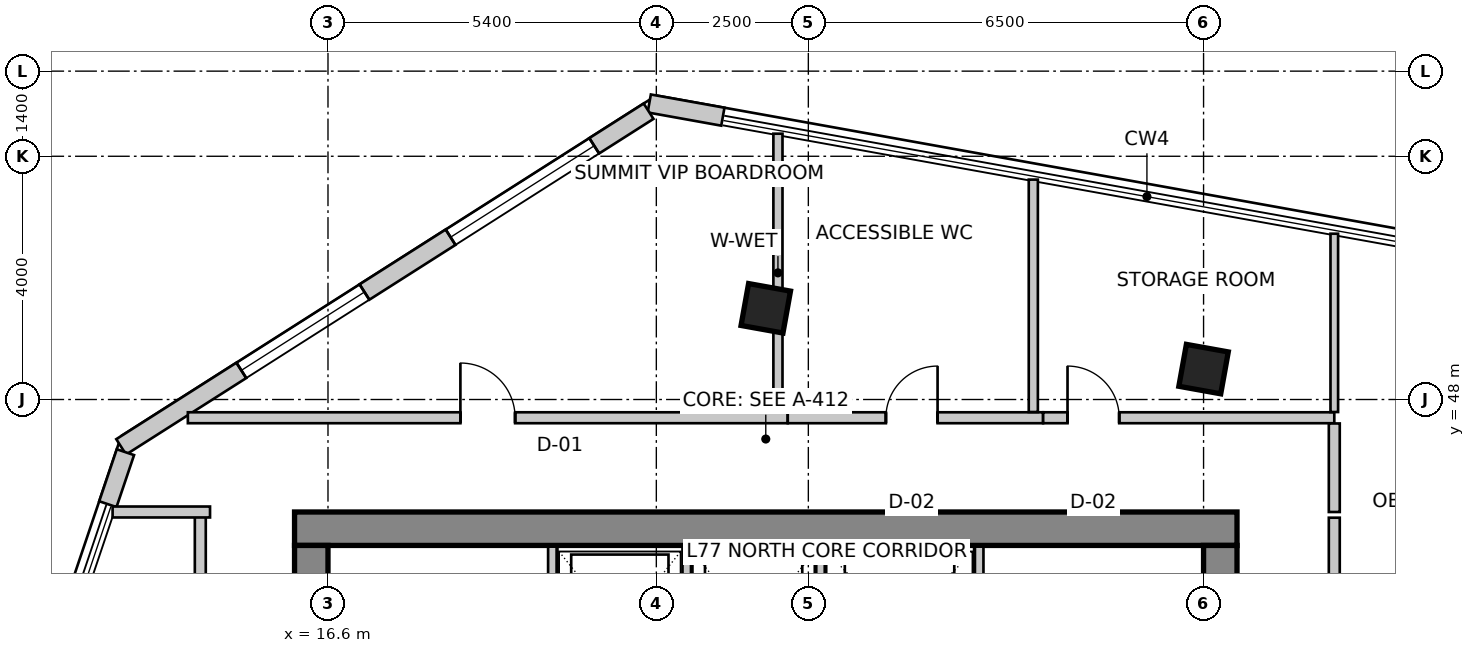
"""IFC4 building model, lengths in metres.
Left out: names, types, materials, properties, quantities, classifications, styles, units other than length and angle.
Written with IfcOpenShell. Run it as: python <this file> out.ifc"""

import sys

from ifc_helpers import new_model, si_unit, direction, frame, frame_2d, origin, origin_2d, place, context, subcontext, project, spatial, rectangle, extrude, source, transform, mapped, element, fill, save


model = new_model("IFC4")
c1 = context("Model", 3, precision=1e-05, world=origin(), true_north=direction((0.0, 1.0)))
c2 = subcontext(c1, "Body", "Model", "MODEL_VIEW")
j1 = project(units=[si_unit("LENGTHUNIT", "METRE"), si_unit("PLANEANGLEUNIT", "RADIAN")], contexts=[c1])
p1 = place(None, origin())
s1 = spatial("IfcSite", under=j1, at=p1, CompositionType="ELEMENT")
p2 = place(p1, origin())
s2 = spatial("IfcBuilding", under=s1, at=p2, CompositionType="ELEMENT")
p3 = place(p2, frame((0.0, 0.0, 300.5)))
s3 = spatial("IfcBuildingStorey", under=s2, at=p3, CompositionType="ELEMENT", Elevation=300.5)
p4 = place(p3, frame((16.05, 45.875, 0.0), z_axis=(0.0, 0.0, 1.0), x_axis=(1.0, 0.0, 0.0)))
e1 = element("IfcWall", 1, at=p4, inside=s3, PredefinedType="SHEAR", context=c2, shape_type="SweptSolid", body=[
    extrude(rectangle(XDim=15.5, YDim=0.55, at=frame_2d((7.75, 0.0))), origin(), (0.0, 0.0, 1.0), 4.0),
])
p5 = place(p3, frame((16.325, 34.2, 0.0), z_axis=(0.0, 0.0, 1.0), x_axis=(0.0, 1.0, 0.0)))
e2 = element("IfcWall", 2, at=p5, inside=s3, PredefinedType="SHEAR", context=c2, shape_type="SweptSolid", body=[
    extrude(rectangle(XDim=11.4, YDim=0.55, at=frame_2d((5.7, 0.0))), origin(), (0.0, 0.0, 1.0), 4.0),
])
m1 = source(origin(), c2, "Body", "SweptSolid", [
    extrude(rectangle(XDim=1.1, YDim=2.15, at=frame_2d((0.55, 1.075))), frame((0.0, 0.285, 0.0), z_axis=(0.0, -1.0, 0.0), x_axis=(1.0, 0.0, 0.0)), (0.0, 0.0, 1.0), 0.57),
])
p6 = place(p5, frame((7.15, 0.0, 0.0)))
e3 = element("IfcOpeningElement", 3, at=p6, cuts=e2, PredefinedType="OPENING", context=c2, shape_type="MappedRepresentation", body=[
    mapped(m1, transform((0.0, 0.0, 0.0), scale=1.0)),
])
p7 = place(p3, frame((31.275, 34.2, 0.0), z_axis=(0.0, 0.0, 1.0), x_axis=(0.0, 1.0, 0.0)))
e4 = element("IfcWall", 4, at=p7, inside=s3, PredefinedType="SHEAR", context=c2, shape_type="SweptSolid", body=[
    extrude(rectangle(XDim=11.4, YDim=0.55, at=frame_2d((5.7, 0.0))), origin(), (0.0, 0.0, 1.0), 4.0),
])
p8 = place(p7, frame((7.35, 0.0, 0.0)))
e5 = element("IfcOpeningElement", 5, at=p8, cuts=e4, PredefinedType="OPENING", context=c2, shape_type="MappedRepresentation", body=[
    mapped(m1, transform((0.0, 0.0, 0.0), scale=1.0)),
])
m2 = source(origin(), c2, "Body", "SweptSolid", [
    extrude(rectangle(XDim=0.7, YDim=0.7, at=origin_2d()), origin(), (0.0, 0.0, 1.0), 4.0),
])
for number, where, z_axis, x_axis in (
    (6, (23.8, 49.5, 0.0), (0.0, 0.0, 1.0), (0.984, -0.177, 0.0)),
    (7, (31.0, 48.5, 0.0), (0.0, 0.0, 1.0), (0.984, -0.177, 0.0)),
):
    element("IfcColumn", number, at=place(p3, frame(where, z_axis=z_axis, x_axis=x_axis)), inside=s3, PredefinedType="COLUMN", context=c2, shape_type="MappedRepresentation", body=[
        mapped(m2, transform((0.0, 0.0, 0.0), scale=1.0)),
    ])
p9 = place(p3, frame((23.094, 52.651, 0.0), z_axis=(0.0, 0.0, 1.0), x_axis=(-0.984233125072, 0.176876102146, 0.0)))
e8 = element("IfcWall", 8, at=p9, inside=s3, PredefinedType="SOLIDWALL", context=c2, shape_type="SweptSolid", body=[
    extrude(rectangle(XDim=1.23, YDim=0.3, at=frame_2d((0.615, 0.0))), origin(), (0.0, 0.0, 1.0), 3.7),
])
p10 = place(p3, frame((21.873, 52.741, 0.0), z_axis=(0.0, 0.0, 1.0), x_axis=(-0.843661487732, -0.536875492193, 0.0)))
e9 = element("IfcWall", 9, at=p10, inside=s3, PredefinedType="SOLIDWALL", context=c2, shape_type="SweptSolid", body=[
    extrude(rectangle(XDim=10.282, YDim=0.3, at=frame_2d((5.141, 0.0))), origin(), (0.0, 0.0, 1.0), 3.7),
])
m3 = source(origin(), c2, "Body", "SweptSolid", [
    extrude(rectangle(XDim=2.8, YDim=2.4, at=frame_2d((1.4, 1.2))), frame((0.0, 0.16, 0.0), z_axis=(0.0, -1.0, 0.0), x_axis=(1.0, 0.0, 0.0)), (0.0, 0.0, 1.0), 0.32),
])
p11 = place(p10, frame((1.06, 0.0, 0.85)))
e10 = element("IfcOpeningElement", 10, at=p11, cuts=e9, PredefinedType="OPENING", context=c2, shape_type="MappedRepresentation", body=[
    mapped(m3, transform((0.0, 0.0, 0.0), scale=1.0)),
])
m4 = source(origin(), c2, "Body", "SweptSolid", [
    extrude(rectangle(XDim=2.4, YDim=2.2, at=frame_2d((1.2, 1.1))), frame((0.0, 0.16, 0.0), z_axis=(0.0, -1.0, 0.0), x_axis=(1.0, 0.0, 0.0)), (0.0, 0.0, 1.0), 0.32),
])
p12 = place(p10, frame((5.539, 0.0, 0.85)))
e11 = element("IfcOpeningElement", 11, at=p12, cuts=e9, PredefinedType="OPENING", context=c2, shape_type="MappedRepresentation", body=[
    mapped(m4, transform((0.0, 0.0, 0.0), scale=1.0)),
])
p13 = place(p3, frame((13.269, 47.134, 0.0), z_axis=(0.0, 0.0, 1.0), x_axis=(-0.31995770778, -0.947431826166, 0.0)))
e12 = element("IfcWall", 12, at=p13, inside=s3, PredefinedType="SOLIDWALL", context=c2, shape_type="SweptSolid", body=[
    extrude(rectangle(XDim=0.903, YDim=0.3, at=frame_2d((0.451, 0.0))), origin(), (0.0, 0.0, 1.0), 3.7),
])
for number, where, z_axis, x_axis in (
    (13, (20.29, 43.28, 0.0), (0.0, 0.0, 1.0), (0.0, 1.0, 0.0)),
    (14, (27.31, 43.28, 0.0), (0.0, 0.0, 1.0), (0.0, 1.0, 0.0)),
):
    element("IfcWall", number, at=place(p3, frame(where, z_axis=z_axis, x_axis=x_axis)), inside=s3, PredefinedType="SOLIDWALL", context=c2, shape_type="SweptSolid", body=[
        extrude(rectangle(XDim=2.3, YDim=0.14, at=frame_2d((1.15, 0.0))), origin(), (0.0, 0.0, 1.0), 3.7),
    ])
for number, where, z_axis, x_axis in (
    (15, (22.5, 43.02, 0.0), (0.0, 0.0, 1.0), (0.0, 1.0, 0.0)),
    (16, (24.7, 43.02, 0.0), (0.0, 0.0, 1.0), (0.0, 1.0, 0.0)),
):
    element("IfcWall", number, at=place(p3, frame(where, z_axis=z_axis, x_axis=x_axis)), inside=s3, PredefinedType="SOLIDWALL", context=c2, shape_type="SweptSolid", body=[
        extrude(rectangle(XDim=2.56, YDim=0.14, at=frame_2d((1.28, 0.0))), origin(), (0.0, 0.0, 1.0), 3.7),
    ])
p14 = place(p3, frame((14.5, 33.744, 0.0), z_axis=(0.0, 0.0, 1.0), x_axis=(0.0, 1.0, 0.0)))
e17 = element("IfcWall", 17, at=p14, inside=s3, PredefinedType="PARTITIONING", context=c2, shape_type="SweptSolid", body=[
    extrude(rectangle(XDim=12.406, YDim=0.18, at=frame_2d((6.203, 0.0))), origin(), (0.0, 0.0, 1.0), 3.7),
])
m5 = source(origin(), c2, "Body", "SweptSolid", [
    extrude(rectangle(XDim=0.9, YDim=2.15, at=frame_2d((0.45, 1.075))), frame((0.0, 0.1, 0.0), z_axis=(0.0, -1.0, 0.0), x_axis=(1.0, 0.0, 0.0)), (0.0, 0.0, 1.0), 0.2),
])
p15 = place(p14, frame((4.37, 0.0, 0.0)))
e18 = element("IfcOpeningElement", 18, at=p15, cuts=e17, PredefinedType="OPENING", context=c2, shape_type="MappedRepresentation", body=[
    mapped(m5, transform((0.0, 0.0, 0.0), scale=1.0)),
])
p16 = place(p3, frame((14.66, 46.15, 0.0), z_axis=(0.0, 0.0, 1.0), x_axis=(-1.0, 0.0, 0.0)))
e19 = element("IfcWall", 19, at=p16, inside=s3, PredefinedType="PARTITIONING", context=c2, shape_type="SweptSolid", body=[
    extrude(rectangle(XDim=1.602, YDim=0.18, at=frame_2d((0.801, 0.0))), origin(), (0.0, 0.0, 1.0), 3.7),
])
p17 = place(p3, frame((14.295, 47.7, 0.0), z_axis=(0.0, 0.0, 1.0), x_axis=(1.0, 0.0, 0.0)))
e20 = element("IfcWall", 20, at=p17, inside=s3, PredefinedType="PARTITIONING", context=c2, shape_type="SweptSolid", body=[
    extrude(rectangle(XDim=9.865, YDim=0.18, at=frame_2d((4.932, 0.0))), origin(), (0.0, 0.0, 1.0), 3.384),
])
p18 = place(p17, frame((4.482, 0.0, 0.0)))
e21 = element("IfcOpeningElement", 21, at=p18, cuts=e20, PredefinedType="OPENING", context=c2, shape_type="MappedRepresentation", body=[
    mapped(m5, transform((0.0, 0.0, 0.0), scale=1.0)),
])
p19 = place(p3, frame((24.162, 47.7, 0.0), z_axis=(0.0, 0.0, 1.0), x_axis=(1.0, 0.0, 0.0)))
e22 = element("IfcWall", 22, at=p19, inside=s3, PredefinedType="PARTITIONING", context=c2, shape_type="SweptSolid", body=[
    extrude(rectangle(XDim=4.198, YDim=0.18, at=frame_2d((2.099, 0.0))), origin(), (0.0, 0.0, 1.0), 3.7),
])
m6 = source(origin(), c2, "Body", "SweptSolid", [
    extrude(rectangle(XDim=0.85, YDim=2.15, at=frame_2d((0.425, 1.075))), frame((0.0, 0.1, 0.0), z_axis=(0.0, -1.0, 0.0), x_axis=(1.0, 0.0, 0.0)), (0.0, 0.0, 1.0), 0.2),
])
p20 = place(p19, frame((1.613, 0.0, 0.0)))
e23 = element("IfcOpeningElement", 23, at=p20, cuts=e22, PredefinedType="OPENING", context=c2, shape_type="MappedRepresentation", body=[
    mapped(m6, transform((0.0, 0.0, 0.0), scale=1.0)),
])
p21 = place(p3, frame((28.362, 47.7, 0.0), z_axis=(0.0, 0.0, 1.0), x_axis=(1.0, 0.0, 0.0)))
e24 = element("IfcWall", 24, at=p21, inside=s3, PredefinedType="PARTITIONING", context=c2, shape_type="SweptSolid", body=[
    extrude(rectangle(XDim=4.788, YDim=0.18, at=frame_2d((2.394, 0.0))), origin(), (0.0, 0.0, 1.0), 3.272),
])
p22 = place(p21, frame((0.401, 0.0, 0.0)))
e25 = element("IfcOpeningElement", 25, at=p22, cuts=e24, PredefinedType="OPENING", context=c2, shape_type="MappedRepresentation", body=[
    mapped(m6, transform((0.0, 0.0, 0.0), scale=1.0)),
])
p23 = place(p3, frame((33.15, 47.606, 0.0), z_axis=(0.0, 0.0, 1.0), x_axis=(0.0, -1.0, 0.0)))
e26 = element("IfcWall", 26, at=p23, inside=s3, PredefinedType="PARTITIONING", context=c2, shape_type="SweptSolid", body=[
    extrude(rectangle(XDim=1.456, YDim=0.18, at=frame_2d((0.728, 0.0))), origin(), (0.0, 0.0, 1.0), 3.7),
])
p24 = place(p3, frame((33.15, 46.056, 0.0), z_axis=(0.0, 0.0, 1.0), x_axis=(0.0, -1.0, 0.0)))
e27 = element("IfcWall", 27, at=p24, inside=s3, PredefinedType="PARTITIONING", context=c2, shape_type="SweptSolid", body=[
    extrude(rectangle(XDim=6.216, YDim=0.18, at=frame_2d((3.108, 0.0))), origin(), (0.0, 0.0, 1.0), 3.272),
])
m7 = source(origin(), c2, "Body", "SweptSolid", [
    extrude(rectangle(XDim=1.6, YDim=2.15, at=frame_2d((0.8, 1.075))), frame((0.0, 0.1, 0.0), z_axis=(0.0, -1.0, 0.0), x_axis=(1.0, 0.0, 0.0)), (0.0, 0.0, 1.0), 0.2),
])
p25 = place(p24, frame((2.247, 0.0, 0.0)))
e28 = element("IfcOpeningElement", 28, at=p25, cuts=e27, PredefinedType="OPENING", context=c2, shape_type="MappedRepresentation", body=[
    mapped(m7, transform((0.0, 0.0, 0.0), scale=1.0)),
])
p26 = place(p3, frame((24.0, 52.371, 0.0), z_axis=(0.0, 0.0, 1.0), x_axis=(0.0, -1.0, 0.0)))
e29 = element("IfcWall", 29, at=p26, inside=s3, PredefinedType="PARTITIONING", context=c2, shape_type="SweptSolid", body=[
    extrude(rectangle(XDim=4.577, YDim=0.15, at=frame_2d((2.289, 0.0))), origin(), (0.0, 0.0, 1.0), 2.992),
])
p27 = place(p3, frame((28.2, 51.616, 0.0), z_axis=(0.0, 0.0, 1.0), x_axis=(0.0, -1.0, 0.0)))
e30 = element("IfcWall", 30, at=p27, inside=s3, PredefinedType="PARTITIONING", context=c2, shape_type="SweptSolid", body=[
    extrude(rectangle(XDim=3.822, YDim=0.15, at=frame_2d((1.911, 0.0))), origin(), (0.0, 0.0, 1.0), 2.992),
])
p28 = place(p3, frame((33.15, 50.727, 0.0), z_axis=(0.0, 0.0, 1.0), x_axis=(0.0, -1.0, 0.0)))
e31 = element("IfcWall", 31, at=p28, inside=s3, PredefinedType="PARTITIONING", context=c2, shape_type="SweptSolid", body=[
    extrude(rectangle(XDim=2.933, YDim=0.125, at=frame_2d((1.466, 0.0))), origin(), (0.0, 0.0, 1.0), 2.992),
])
m8 = source(origin(), c2, "Body", "SweptSolid", [
    extrude(rectangle(XDim=2.8, YDim=2.4, at=frame_2d((1.4, 1.2))), frame((0.0, -0.015, 0.0), z_axis=(0.0, -1.0, 0.0), x_axis=(1.0, 0.0, 0.0)), (0.0, 0.0, 1.0), 0.06),
])
p29 = place(p11, origin())
e32 = element("IfcWindow", 32, at=p29, inside=s3, PartitioningType="SINGLE_PANEL", PredefinedType="WINDOW", context=c2, shape_type="MappedRepresentation", body=[
    mapped(m8, transform((0.0, 0.0, 0.0), scale=1.0)),
])
fill(e10, e32)
m9 = source(origin(), c2, "Body", "SweptSolid", [
    extrude(rectangle(XDim=2.4, YDim=2.2, at=frame_2d((1.2, 1.1))), frame((0.0, -0.015, 0.0), z_axis=(0.0, -1.0, 0.0), x_axis=(1.0, 0.0, 0.0)), (0.0, 0.0, 1.0), 0.06),
])
p30 = place(p12, origin())
e33 = element("IfcWindow", 33, at=p30, inside=s3, PartitioningType="SINGLE_PANEL", PredefinedType="WINDOW", context=c2, shape_type="MappedRepresentation", body=[
    mapped(m9, transform((0.0, 0.0, 0.0), scale=1.0)),
])
fill(e11, e33)
m10 = source(origin(), c2, "Body", "SweptSolid", [
    extrude(rectangle(XDim=0.9, YDim=2.15, at=frame_2d((0.45, 1.075))), frame((0.0, 0.025, 0.0), z_axis=(0.0, -1.0, 0.0), x_axis=(1.0, 0.0, 0.0)), (0.0, 0.0, 1.0), 0.05),
])
p31 = place(p18, origin())
e34 = element("IfcDoor", 34, at=p31, inside=s3, OperationType="SINGLE_SWING_LEFT", PredefinedType="DOOR", context=c2, shape_type="MappedRepresentation", body=[
    mapped(m10, transform((0.0, 0.0, 0.0), scale=1.0)),
])
fill(e21, e34)
m11 = source(origin(), c2, "Body", "SweptSolid", [
    extrude(rectangle(XDim=0.85, YDim=2.15, at=frame_2d((0.425, 1.075))), frame((0.0, 0.025, 0.0), z_axis=(0.0, -1.0, 0.0), x_axis=(1.0, 0.0, 0.0)), (0.0, 0.0, 1.0), 0.05),
])
p32 = place(p20, origin())
e35 = element("IfcDoor", 35, at=p32, inside=s3, OperationType="SINGLE_SWING_RIGHT", PredefinedType="DOOR", context=c2, shape_type="MappedRepresentation", body=[
    mapped(m11, transform((0.0, 0.0, 0.0), scale=1.0)),
])
fill(e23, e35)
p33 = place(p22, origin())
e36 = element("IfcDoor", 36, at=p33, inside=s3, OperationType="SINGLE_SWING_LEFT", PredefinedType="DOOR", context=c2, shape_type="MappedRepresentation", body=[
    mapped(m11, transform((0.0, 0.0, 0.0), scale=1.0)),
])
fill(e25, e36)
save(model, sys.argv[1])
